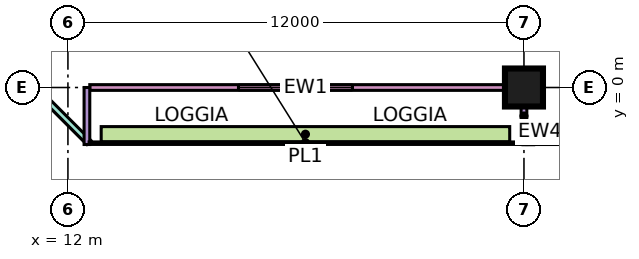
"""IFC4 building model, lengths in metres.
Left out: names, types, materials, properties, quantities, classifications, styles, units other than length and angle.
Written with IfcOpenShell. Run it as: python <this file> out.ifc"""

import sys

from ifc_helpers import new_model, si_unit, direction, frame, frame_2d, origin, origin_2d, place, context, subcontext, project, spatial, rectangle, extrude, element, fill, save


model = new_model("IFC4")
c1 = context("Model", 3, precision=1e-05, world=origin(), true_north=direction((0.0, 1.0)))
c2 = subcontext(c1, "Body", "Model", "MODEL_VIEW")
j1 = project(units=[si_unit("LENGTHUNIT", "METRE"), si_unit("PLANEANGLEUNIT", "RADIAN")], contexts=[c1])
p1 = place(None, origin())
s1 = spatial("IfcSite", under=j1, at=p1, CompositionType="ELEMENT")
p2 = place(p1, origin())
s2 = spatial("IfcBuilding", under=s1, at=p2, CompositionType="ELEMENT")
p3 = place(p2, frame((0.0, 0.0, 146.15)))
s3 = spatial("IfcBuildingStorey", under=s2, at=p3, CompositionType="ELEMENT", Elevation=146.15)
p4 = place(p3, frame((24.0, 0.0, 0.0), z_axis=(0.0, 0.0, 1.0), x_axis=(1.0, 0.0, 0.0)))
e1 = element("IfcColumn", 1, at=p4, inside=s3, PredefinedType="COLUMN", context=c2, shape_type="SweptSolid", body=[
    extrude(rectangle(XDim=1.0, YDim=1.0, at=origin_2d()), origin(), (0.0, 0.0, 1.0), 11.25),
])
p5 = place(p3, frame((-1.447, 12.553, 0.0), z_axis=(0.0, 0.0, 1.0), x_axis=(0.707106781187, -0.707106781187, 0.0)))
e2 = element("IfcWall", 2, at=p5, inside=s3, PredefinedType="SOLIDWALL", context=c2, shape_type="SweptSolid", body=[
    extrude(rectangle(XDim=19.799, YDim=0.15, at=frame_2d((9.899, 0.0))), origin(), (0.0, 0.0, 1.0), 10.85),
])
p6 = place(p5, frame((8.399, 0.0, 0.45)))
e3 = element("IfcOpeningElement", 3, at=p6, cuts=e2, PredefinedType="OPENING", context=c2, shape_type="SweptSolid", body=[
    extrude(rectangle(XDim=3.0, YDim=9.8, at=frame_2d((1.5, 4.9))), frame((0.0, 0.085, 0.0), z_axis=(0.0, -1.0, 0.0), x_axis=(1.0, 0.0, 0.0)), (0.0, 0.0, 1.0), 0.17),
])
p7 = place(p3, frame((12.575, 0.0, 0.0), z_axis=(0.0, 0.0, 1.0), x_axis=(1.0, 0.0, 0.0)))
e4 = element("IfcWall", 4, at=p7, inside=s3, PredefinedType="SOLIDWALL", context=c2, shape_type="SweptSolid", body=[
    extrude(rectangle(XDim=11.35, YDim=0.15, at=frame_2d((5.675, 0.0))), origin(), (0.0, 0.0, 1.0), 10.85),
])
p8 = place(p7, frame((3.913, 0.0, 0.45)))
e5 = element("IfcOpeningElement", 5, at=p8, cuts=e4, PredefinedType="OPENING", context=c2, shape_type="SweptSolid", body=[
    extrude(rectangle(XDim=3.0, YDim=9.8, at=frame_2d((1.5, 4.9))), frame((0.0, 0.085, 0.0), z_axis=(0.0, -1.0, 0.0), x_axis=(1.0, 0.0, 0.0)), (0.0, 0.0, 1.0), 0.17),
])
for number, where, z_axis, x_axis in (
    (6, (12.5, -1.5, 0.0), (0.0, 0.0, 1.0), (0.0, 1.0, 0.0)),
    (7, (24.0, -1.5, 0.0), (0.0, 0.0, 1.0), (0.0, 1.0, 0.0)),
):
    element("IfcWall", number, at=place(p3, frame(where, z_axis=z_axis, x_axis=x_axis)), inside=s3, PredefinedType="SOLIDWALL", context=c2, shape_type="SweptSolid", body=[
        extrude(rectangle(XDim=1.5, YDim=0.15, at=frame_2d((0.75, 0.0))), origin(), (0.0, 0.0, 1.0), 10.85),
    ])
p9 = place(p3, frame((12.875, -1.229, 0.0), z_axis=(0.0, 0.0, 1.0), x_axis=(1.0, 0.0, 0.0)))
e8 = element("IfcWall", 8, at=p9, inside=s3, PredefinedType="SOLIDWALL", context=c2, shape_type="SweptSolid", body=[
    extrude(rectangle(XDim=10.75, YDim=0.4, at=frame_2d((5.375, 0.0))), origin(), (0.0, 0.0, 1.0), 0.7),
])
p10 = place(p8, origin())
e9 = element("IfcWindow", 9, at=p10, inside=s3, PartitioningType="SINGLE_PANEL", PredefinedType="WINDOW", context=c2, shape_type="SweptSolid", body=[
    extrude(rectangle(XDim=3.0, YDim=9.8, at=frame_2d((1.5, 4.9))), frame((0.0, 0.03, 0.0), z_axis=(0.0, -1.0, 0.0), x_axis=(1.0, 0.0, 0.0)), (0.0, 0.0, 1.0), 0.06),
])
fill(e5, e9)
save(model, sys.argv[1])
